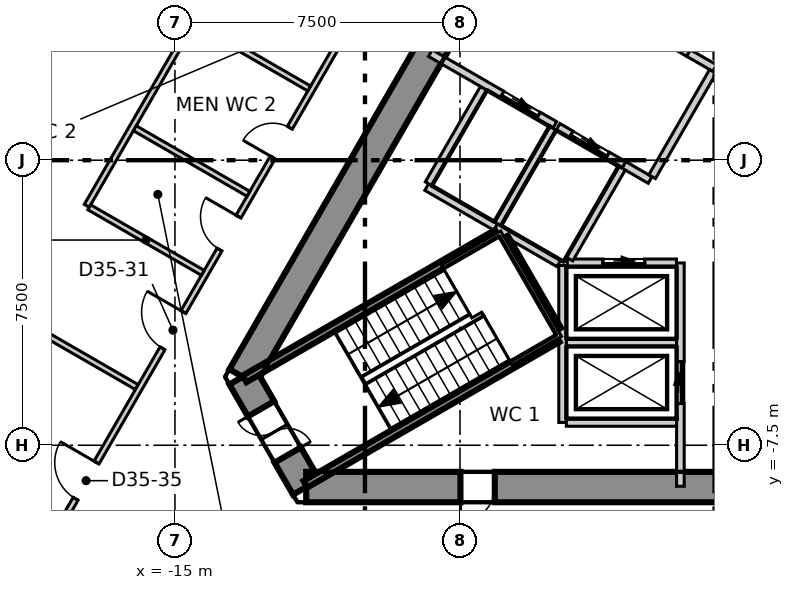
"""IFC4 building model, lengths in metres.
Left out: names, types, materials, properties, quantities, classifications, styles, units other than length and angle.
Written with IfcOpenShell. Run it as: python <this file> out.ifc"""

import sys

from ifc_helpers import new_model, si_unit, direction, frame, frame_2d, origin, place, context, subcontext, project, spatial, polyline, rectangle, outline, extrude, element, fill, save


model = new_model("IFC4")
c1 = context("Model", 3, precision=1e-05, world=origin(), true_north=direction((0.0, 1.0)))
c2 = subcontext(c1, "Body", "Model", "MODEL_VIEW")
j1 = project(units=[si_unit("LENGTHUNIT", "METRE"), si_unit("PLANEANGLEUNIT", "RADIAN")], contexts=[c1])
p1 = place(None, origin())
s1 = spatial("IfcSite", under=j1, at=p1, CompositionType="ELEMENT")
p2 = place(p1, origin())
s2 = spatial("IfcBuilding", under=s1, at=p2, CompositionType="ELEMENT")
p3 = place(p2, frame((0.0, 0.0, 152.3)))
s3 = spatial("IfcBuildingStorey", under=s2, at=p3, CompositionType="ELEMENT", Elevation=152.3)
p4 = place(p3, frame((-1.674, 14.3, -0.3), z_axis=(0.0, 0.0, 1.0), x_axis=(-0.499995765644, -0.866027848477, 0.0)))
e1 = element("IfcWall", 1, at=p4, inside=s3, PredefinedType="SHEAR", context=c2, shape_type="SweptSolid", body=[
    extrude(outline(polyline([(-0.231, -0.4), (1.732, -0.4), (3.695, -0.4), (5.658, -0.4), (7.621, -0.4), (9.584, -0.4), (11.547, -0.4), (13.51, -0.4), (15.473, -0.4), (17.436, -0.4), (19.399, -0.4), (21.362, -0.4), (23.325, -0.4), (22.863, 0.4), (20.977, 0.4), (19.091, 0.4), (17.205, 0.4), (15.319, 0.4), (13.433, 0.4), (11.547, 0.4), (9.661, 0.4), (7.775, 0.4), (5.889, 0.4), (4.003, 0.4), (2.117, 0.4), (0.231, 0.4), (-0.231, -0.4)])), origin(), (0.0, 0.0, 1.0), 4.0),
])
p5 = place(p4, frame((10.997, 0.0, 0.3)))
e2 = element("IfcOpeningElement", 2, at=p5, cuts=e1, PredefinedType="OPENING", context=c2, shape_type="SweptSolid", body=[
    extrude(rectangle(XDim=1.1, YDim=2.1, at=frame_2d((0.55, 1.05))), frame((0.0, 0.41, 0.0), z_axis=(0.0, -1.0, 0.0), x_axis=(1.0, 0.0, 0.0)), (0.0, 0.0, 1.0), 0.82),
])
p6 = place(p4, frame((4.474, 0.0, 0.3)))
e3 = element("IfcOpeningElement", 3, at=p6, cuts=e1, PredefinedType="OPENING", context=c2, shape_type="SweptSolid", body=[
    extrude(rectangle(XDim=0.9, YDim=2.1, at=frame_2d((0.45, 1.05))), frame((0.0, 0.41, 0.0), z_axis=(0.0, -1.0, 0.0), x_axis=(1.0, 0.0, 0.0)), (0.0, 0.0, 1.0), 0.82),
])
p7 = place(p3, frame((-13.221, -5.7, -0.3), z_axis=(0.0, 0.0, 1.0), x_axis=(0.49987182685, -0.866099391942, 0.0)))
e4 = element("IfcWall", 4, at=p7, inside=s3, PredefinedType="SHEAR", context=c2, shape_type="SweptSolid", body=[
    extrude(outline(polyline([(-0.231, -0.4), (1.674, -0.4), (3.579, -0.4), (3.118, 0.4), (1.674, 0.4), (0.231, 0.4), (-0.231, -0.4)])), origin(), (0.0, 0.0, 1.0), 4.0),
])
p8 = place(p7, frame((0.974, 0.0, 0.3)))
e5 = element("IfcOpeningElement", 5, at=p8, cuts=e4, PredefinedType="OPENING", context=c2, shape_type="SweptSolid", body=[
    extrude(rectangle(XDim=1.4, YDim=2.1, at=frame_2d((0.7, 1.05))), frame((0.0, 0.41, 0.0), z_axis=(0.0, -1.0, 0.0), x_axis=(1.0, 0.0, 0.0)), (0.0, 0.0, 1.0), 0.82),
])
p9 = place(p3, frame((-11.547, -8.6, -0.3), z_axis=(0.0, 0.0, 1.0), x_axis=(1.0, 0.0, 0.0)))
e6 = element("IfcWall", 6, at=p9, inside=s3, PredefinedType="SHEAR", context=c2, shape_type="SweptSolid", body=[
    extrude(outline(polyline([(-0.231, -0.4), (1.732, -0.4), (3.695, -0.4), (5.658, -0.4), (7.621, -0.4), (9.584, -0.4), (11.547, -0.4), (13.51, -0.4), (15.473, -0.4), (17.436, -0.4), (19.399, -0.4), (21.362, -0.4), (23.325, -0.4), (22.863, 0.4), (20.977, 0.4), (19.091, 0.4), (17.205, 0.4), (15.319, 0.4), (13.433, 0.4), (11.547, 0.4), (9.661, 0.4), (7.775, 0.4), (5.889, 0.4), (4.003, 0.4), (2.117, 0.4), (0.231, 0.4), (-0.231, -0.4)])), origin(), (0.0, 0.0, 1.0), 4.0),
])
p10 = place(p9, frame((4.061, 0.0, 0.3)))
e7 = element("IfcOpeningElement", 7, at=p10, cuts=e6, PredefinedType="OPENING", context=c2, shape_type="SweptSolid", body=[
    extrude(rectangle(XDim=0.9, YDim=2.1, at=frame_2d((0.45, 1.05))), frame((0.0, 0.41, 0.0), z_axis=(0.0, -1.0, 0.0), x_axis=(1.0, 0.0, 0.0)), (0.0, 0.0, 1.0), 0.82),
])
p11 = place(p9, frame((18.143, 0.0, 0.3)))
e8 = element("IfcOpeningElement", 8, at=p11, cuts=e6, PredefinedType="OPENING", context=c2, shape_type="SweptSolid", body=[
    extrude(rectangle(XDim=1.0, YDim=2.1, at=frame_2d((0.5, 1.05))), frame((0.0, 0.41, 0.0), z_axis=(0.0, -1.0, 0.0), x_axis=(1.0, 0.0, 0.0)), (0.0, 0.0, 1.0), 0.82),
])
p12 = place(p3, frame((-3.018, 33.666, 0.0), z_axis=(0.0, 0.0, 1.0), x_axis=(-0.499984613623, -0.866034286931, 0.0)))
e9 = element("IfcWall", 9, at=p12, inside=s3, PredefinedType="ELEMENTEDWALL", context=c2, shape_type="SweptSolid", body=[
    extrude(rectangle(XDim=55.274, YDim=0.2, at=frame_2d((27.637, 0.0))), origin(), (0.0, 0.0, 1.0), 3.7),
])
p13 = place(p12, frame((2.145, 0.0, 0.9)))
e10 = element("IfcOpeningElement", 10, at=p13, cuts=e9, PredefinedType="OPENING", context=c2, shape_type="SweptSolid", body=[
    extrude(rectangle(XDim=4.9, YDim=2.5, at=frame_2d((2.45, 1.25))), frame((0.0, 0.11, 0.0), z_axis=(0.0, -1.0, 0.0), x_axis=(1.0, 0.0, 0.0)), (0.0, 0.0, 1.0), 0.22),
])
p14 = place(p12, frame((8.731, 0.0, 0.9)))
e11 = element("IfcOpeningElement", 11, at=p14, cuts=e9, PredefinedType="OPENING", context=c2, shape_type="SweptSolid", body=[
    extrude(rectangle(XDim=4.9, YDim=2.5, at=frame_2d((2.45, 1.25))), frame((0.0, 0.11, 0.0), z_axis=(0.0, -1.0, 0.0), x_axis=(1.0, 0.0, 0.0)), (0.0, 0.0, 1.0), 0.22),
])
p15 = place(p12, frame((15.318, 0.0, 0.9)))
e12 = element("IfcOpeningElement", 12, at=p15, cuts=e9, PredefinedType="OPENING", context=c2, shape_type="SweptSolid", body=[
    extrude(rectangle(XDim=4.9, YDim=2.5, at=frame_2d((2.45, 1.25))), frame((0.0, 0.11, 0.0), z_axis=(0.0, -1.0, 0.0), x_axis=(1.0, 0.0, 0.0)), (0.0, 0.0, 1.0), 0.22),
])
p16 = place(p12, frame((21.904, 0.0, 0.9)))
e13 = element("IfcOpeningElement", 13, at=p16, cuts=e9, PredefinedType="OPENING", context=c2, shape_type="SweptSolid", body=[
    extrude(rectangle(XDim=4.9, YDim=2.5, at=frame_2d((2.45, 1.25))), frame((0.0, 0.11, 0.0), z_axis=(0.0, -1.0, 0.0), x_axis=(1.0, 0.0, 0.0)), (0.0, 0.0, 1.0), 0.22),
])
p17 = place(p12, frame((28.49, 0.0, 0.9)))
e14 = element("IfcOpeningElement", 14, at=p17, cuts=e9, PredefinedType="OPENING", context=c2, shape_type="SweptSolid", body=[
    extrude(rectangle(XDim=4.9, YDim=2.5, at=frame_2d((2.45, 1.25))), frame((0.0, 0.11, 0.0), z_axis=(0.0, -1.0, 0.0), x_axis=(1.0, 0.0, 0.0)), (0.0, 0.0, 1.0), 0.22),
])
p18 = place(p12, frame((35.076, 0.0, 0.9)))
e15 = element("IfcOpeningElement", 15, at=p18, cuts=e9, PredefinedType="OPENING", context=c2, shape_type="SweptSolid", body=[
    extrude(rectangle(XDim=4.9, YDim=2.5, at=frame_2d((2.45, 1.25))), frame((0.0, 0.11, 0.0), z_axis=(0.0, -1.0, 0.0), x_axis=(1.0, 0.0, 0.0)), (0.0, 0.0, 1.0), 0.22),
])
p19 = place(p12, frame((41.662, 0.0, 0.9)))
e16 = element("IfcOpeningElement", 16, at=p19, cuts=e9, PredefinedType="OPENING", context=c2, shape_type="SweptSolid", body=[
    extrude(rectangle(XDim=4.9, YDim=2.5, at=frame_2d((2.45, 1.25))), frame((0.0, 0.11, 0.0), z_axis=(0.0, -1.0, 0.0), x_axis=(1.0, 0.0, 0.0)), (0.0, 0.0, 1.0), 0.22),
])
p20 = place(p12, frame((48.248, 0.0, 0.9)))
e17 = element("IfcOpeningElement", 17, at=p20, cuts=e9, PredefinedType="OPENING", context=c2, shape_type="SweptSolid", body=[
    extrude(rectangle(XDim=4.9, YDim=2.5, at=frame_2d((2.45, 1.25))), frame((0.0, 0.11, 0.0), z_axis=(0.0, -1.0, 0.0), x_axis=(1.0, 0.0, 0.0)), (0.0, 0.0, 1.0), 0.22),
])
p21 = place(p3, frame((-23.357, -1.725, 0.0), z_axis=(0.0, 0.0, 1.0), x_axis=(0.866045766046, -0.49996472987, 0.0)))
e18 = element("IfcWall", 18, at=p21, inside=s3, PredefinedType="PARTITIONING", context=c2, shape_type="SweptSolid", body=[
    extrude(rectangle(XDim=8.49, YDim=0.15, at=frame_2d((4.245, 0.0))), origin(), (0.0, 0.0, 1.0), 3.7),
])
p22 = place(p3, frame((-18.631, -10.67, 0.0), z_axis=(0.0, 0.0, 1.0), x_axis=(0.500017706633, 0.866015180614, 0.0)))
e19 = element("IfcWall", 19, at=p22, inside=s3, PredefinedType="PARTITIONING", context=c2, shape_type="SweptSolid", body=[
    extrude(rectangle(XDim=17.656, YDim=0.15, at=frame_2d((8.828, 0.0))), origin(), (0.0, 0.0, 1.0), 3.7),
])
p23 = place(p22, frame((6.606, 0.0, 0.0)))
e20 = element("IfcOpeningElement", 20, at=p23, cuts=e19, PredefinedType="OPENING", context=c2, shape_type="SweptSolid", body=[
    extrude(rectangle(XDim=1.1, YDim=2.1, at=frame_2d((0.55, 1.05))), frame((0.0, 0.085, 0.0), z_axis=(0.0, -1.0, 0.0), x_axis=(1.0, 0.0, 0.0)), (0.0, 0.0, 1.0), 0.17),
])
p24 = place(p22, frame((12.406, 0.0, 0.0)))
e21 = element("IfcOpeningElement", 21, at=p24, cuts=e19, PredefinedType="OPENING", context=c2, shape_type="SweptSolid", body=[
    extrude(rectangle(XDim=0.9, YDim=2.1, at=frame_2d((0.45, 1.05))), frame((0.0, 0.085, 0.0), z_axis=(0.0, -1.0, 0.0), x_axis=(1.0, 0.0, 0.0)), (0.0, 0.0, 1.0), 0.17),
])
p25 = place(p22, frame((9.606, 0.0, 0.0)))
e22 = element("IfcOpeningElement", 22, at=p25, cuts=e19, PredefinedType="OPENING", context=c2, shape_type="SweptSolid", body=[
    extrude(rectangle(XDim=1.0, YDim=2.1, at=frame_2d((0.5, 1.05))), frame((0.0, 0.085, 0.0), z_axis=(0.0, -1.0, 0.0), x_axis=(1.0, 0.0, 0.0)), (0.0, 0.0, 1.0), 0.17),
])
p26 = place(p22, frame((2.034, 0.0, 0.0)))
e23 = element("IfcOpeningElement", 23, at=p26, cuts=e19, PredefinedType="OPENING", context=c2, shape_type="SweptSolid", body=[
    extrude(rectangle(XDim=1.1, YDim=2.1, at=frame_2d((0.55, 1.05))), frame((0.0, 0.085, 0.0), z_axis=(0.0, -1.0, 0.0), x_axis=(1.0, 0.0, 0.0)), (0.0, 0.0, 1.0), 0.17),
])
p27 = place(p3, frame((-17.321, -1.2, 0.0), z_axis=(0.0, 0.0, 1.0), x_axis=(0.500054279689, 0.865994063124, 0.0)))
e24 = element("IfcWall", 24, at=p27, inside=s3, PredefinedType="PARTITIONING", context=c2, shape_type="SweptSolid", body=[
    extrude(rectangle(XDim=8.725, YDim=0.15, at=frame_2d((4.363, 0.0))), origin(), (0.0, 0.0, 1.0), 3.7),
])
p28 = place(p3, frame((-17.256, -1.238, 0.0), z_axis=(0.0, 0.0, 1.0), x_axis=(0.866061862632, -0.499936846106, 0.0)))
e25 = element("IfcWall", 25, at=p28, inside=s3, PredefinedType="PARTITIONING", context=c2, shape_type="SweptSolid", body=[
    extrude(rectangle(XDim=3.45, YDim=0.15, at=frame_2d((1.725, 0.0))), origin(), (0.0, 0.0, 1.0), 3.7),
])
p29 = place(p3, frame((-16.056, 0.841, 0.0), z_axis=(0.0, 0.0, 1.0), x_axis=(0.866013532718, -0.500020560727, 0.0)))
e26 = element("IfcWall", 26, at=p29, inside=s3, PredefinedType="PARTITIONING", context=c2, shape_type="SweptSolid", body=[
    extrude(rectangle(XDim=3.45, YDim=0.15, at=frame_2d((1.725, 0.0))), origin(), (0.0, 0.0, 1.0), 3.7),
])
p30 = place(p3, frame((-14.456, 3.612, 0.0), z_axis=(0.0, 0.0, 1.0), x_axis=(0.866031223622, -0.49998991961, 0.0)))
e27 = element("IfcWall", 27, at=p30, inside=s3, PredefinedType="PARTITIONING", context=c2, shape_type="SweptSolid", body=[
    extrude(rectangle(XDim=3.45, YDim=0.15, at=frame_2d((1.725, 0.0))), origin(), (0.0, 0.0, 1.0), 3.7),
])
p31 = place(p3, frame((-8.376, -0.707, 0.0), z_axis=(0.0, 0.0, 1.0), x_axis=(0.866067520717, -0.499927044236, 0.0)))
e28 = element("IfcWall", 28, at=p31, inside=s3, PredefinedType="SOLIDWALL", context=c2, shape_type="SweptSolid", body=[
    extrude(rectangle(XDim=2.1, YDim=0.2, at=frame_2d((1.05, 0.0))), origin(), (0.0, 0.0, 1.0), 3.7),
])
p32 = place(p3, frame((-8.326, -0.62, 0.0), z_axis=(0.0, 0.0, 1.0), x_axis=(0.500023687443, 0.866011727401, 0.0)))
e29 = element("IfcWall", 29, at=p32, inside=s3, PredefinedType="SOLIDWALL", context=c2, shape_type="SweptSolid", body=[
    extrude(rectangle(XDim=2.9, YDim=0.2, at=frame_2d((1.45, 0.0))), origin(), (0.0, 0.0, 1.0), 3.7),
])
p33 = place(p3, frame((-4.8, -6.9, 0.0), z_axis=(0.0, 0.0, 1.0), x_axis=(0.0, 1.0, 0.0)))
e30 = element("IfcWall", 30, at=p33, inside=s3, PredefinedType="SOLIDWALL", context=c2, shape_type="SweptSolid", body=[
    extrude(rectangle(XDim=4.131, YDim=0.2, at=frame_2d((2.065, 0.0))), origin(), (0.0, 0.0, 1.0), 3.7),
])
for number, where, z_axis, x_axis in (
    (31, (-4.7, -6.9, 0.0), (0.0, 0.0, 1.0), (1.0, 0.0, 0.0)),
    (32, (-4.7, -4.8, 0.0), (0.0, 0.0, 1.0), (1.0, 0.0, 0.0)),
):
    element("IfcWall", number, at=place(p3, frame(where, z_axis=z_axis, x_axis=x_axis)), inside=s3, PredefinedType="SOLIDWALL", context=c2, shape_type="SweptSolid", body=[
        extrude(rectangle(XDim=2.9, YDim=0.2, at=frame_2d((1.45, 0.0))), origin(), (0.0, 0.0, 1.0), 3.7),
    ])
p34 = place(p3, frame((-1.7, -8.58, 0.0), z_axis=(0.0, 0.0, 1.0), x_axis=(0.0, 1.0, 0.0)))
e33 = element("IfcWall", 33, at=p34, inside=s3, PredefinedType="SOLIDWALL", context=c2, shape_type="SweptSolid", body=[
    extrude(rectangle(XDim=5.877, YDim=0.2, at=frame_2d((2.938, 0.0))), origin(), (0.0, 0.0, 1.0), 3.7),
])
p35 = place(p34, frame((2.18, 0.0, 0.0)))
e34 = element("IfcOpeningElement", 34, at=p35, cuts=e33, PredefinedType="OPENING", context=c2, shape_type="SweptSolid", body=[
    extrude(rectangle(XDim=1.1, YDim=2.1, at=frame_2d((0.55, 1.05))), frame((0.0, 0.11, 0.0), z_axis=(0.0, -1.0, 0.0), x_axis=(1.0, 0.0, 0.0)), (0.0, 0.0, 1.0), 0.22),
])
p36 = place(p3, frame((-4.676, -2.7, 0.0), z_axis=(0.0, 0.0, 1.0), x_axis=(1.0, 0.0, 0.0)))
e35 = element("IfcWall", 35, at=p36, inside=s3, PredefinedType="SOLIDWALL", context=c2, shape_type="SweptSolid", body=[
    extrude(rectangle(XDim=2.873, YDim=0.2, at=frame_2d((1.437, 0.0))), origin(), (0.0, 0.0, 1.0), 3.7),
])
p37 = place(p36, frame((0.937, 0.0, 0.0)))
e36 = element("IfcOpeningElement", 36, at=p37, cuts=e35, PredefinedType="OPENING", context=c2, shape_type="SweptSolid", body=[
    extrude(rectangle(XDim=1.1, YDim=2.1, at=frame_2d((0.55, 1.05))), frame((0.0, 0.11, 0.0), z_axis=(0.0, -1.0, 0.0), x_axis=(1.0, 0.0, 0.0)), (0.0, 0.0, 1.0), 0.22),
])
p38 = place(p3, frame((-8.28, 2.818, 0.0), z_axis=(0.0, 0.0, 1.0), x_axis=(0.86600175068, -0.50004096614, 0.0)))
e37 = element("IfcWall", 37, at=p38, inside=s3, PredefinedType="SOLIDWALL", context=c2, shape_type="SweptSolid", body=[
    extrude(rectangle(XDim=3.782, YDim=0.2, at=frame_2d((1.891, 0.0))), origin(), (0.0, 0.0, 1.0), 3.7),
])
p39 = place(p38, frame((2.18, 0.0, 0.0)))
e38 = element("IfcOpeningElement", 38, at=p39, cuts=e37, PredefinedType="OPENING", context=c2, shape_type="SweptSolid", body=[
    extrude(rectangle(XDim=1.1, YDim=2.1, at=frame_2d((0.55, 1.05))), frame((0.0, 0.11, 0.0), z_axis=(0.0, -1.0, 0.0), x_axis=(1.0, 0.0, 0.0)), (0.0, 0.0, 1.0), 0.22),
])
p40 = place(p3, frame((-3.188, -0.122, 0.0), z_axis=(0.0, 0.0, 1.0), x_axis=(0.865705793592, -0.50055317294, 0.0)))
e39 = element("IfcWall", 39, at=p40, inside=s3, PredefinedType="SOLIDWALL", context=c2, shape_type="SweptSolid", body=[
    extrude(rectangle(XDim=0.797, YDim=0.2, at=frame_2d((0.398, 0.0))), origin(), (0.0, 0.0, 1.0), 3.7),
])
p41 = place(p3, frame((-1.488, 2.822, 0.0), z_axis=(0.0, 0.0, 1.0), x_axis=(0.866236612152, -0.499633997809, 0.0)))
e40 = element("IfcWall", 40, at=p41, inside=s3, PredefinedType="SOLIDWALL", context=c2, shape_type="SweptSolid", body=[
    extrude(rectangle(XDim=0.796, YDim=0.2, at=frame_2d((0.398, 0.0))), origin(), (0.0, 0.0, 1.0), 3.7),
])
p42 = place(p3, frame((-2.444, -0.433, 0.0), z_axis=(0.0, 0.0, 1.0), x_axis=(0.500035624827, 0.866004834804, 0.0)))
e41 = element("IfcWall", 41, at=p42, inside=s3, PredefinedType="SOLIDWALL", context=c2, shape_type="SweptSolid", body=[
    extrude(rectangle(XDim=3.194, YDim=0.2, at=frame_2d((1.597, 0.0))), origin(), (0.0, 0.0, 1.0), 3.7),
])
p43 = place(p3, frame((-6.557, -1.757, 0.0), z_axis=(0.0, 0.0, 1.0), x_axis=(0.8659754619, -0.500086491905, 0.0)))
e42 = element("IfcWall", 42, at=p43, inside=s3, PredefinedType="SOLIDWALL", context=c2, shape_type="SweptSolid", body=[
    extrude(rectangle(XDim=1.916, YDim=0.2, at=frame_2d((0.958, 0.0))), origin(), (0.0, 0.0, 1.0), 3.7),
])
p44 = place(p3, frame((-6.507, -1.67, 0.0), z_axis=(0.0, 0.0, 1.0), x_axis=(0.50012328804, 0.865954211699, 0.0)))
e43 = element("IfcWall", 43, at=p44, inside=s3, PredefinedType="SOLIDWALL", context=c2, shape_type="SweptSolid", body=[
    extrude(rectangle(XDim=2.9, YDim=0.2, at=frame_2d((1.45, 0.0))), origin(), (0.0, 0.0, 1.0), 3.7),
])
p45 = place(p3, frame((-4.92, 0.878, 0.0), z_axis=(0.0, 0.0, 1.0), x_axis=(0.866010750942, -0.50002537861, 0.0)))
e44 = element("IfcWall", 44, at=p45, inside=s3, PredefinedType="SOLIDWALL", context=c2, shape_type="SweptSolid", body=[
    extrude(rectangle(XDim=2.0, YDim=0.2, at=frame_2d((1.0, 0.0))), origin(), (0.0, 0.0, 1.0), 3.7),
])
p46 = place(p45, frame((0.4, 0.0, 0.0)))
e45 = element("IfcOpeningElement", 45, at=p46, cuts=e44, PredefinedType="OPENING", context=c2, shape_type="SweptSolid", body=[
    extrude(rectangle(XDim=1.1, YDim=2.1, at=frame_2d((0.55, 1.05))), frame((0.0, 0.11, 0.0), z_axis=(0.0, -1.0, 0.0), x_axis=(1.0, 0.0, 0.0)), (0.0, 0.0, 1.0), 0.22),
])
p47 = place(p3, frame((-4.619, -2.6, 0.0), z_axis=(0.0, 0.0, 1.0), x_axis=(0.50009492287, 0.865970593103, 0.0)))
e46 = element("IfcWall", 46, at=p47, inside=s3, PredefinedType="SOLIDWALL", context=c2, shape_type="SweptSolid", body=[
    extrude(rectangle(XDim=2.761, YDim=0.2, at=frame_2d((1.381, 0.0))), origin(), (0.0, 0.0, 1.0), 3.7),
])
p48 = place(p3, frame((-3.309, 3.873, 0.0), z_axis=(0.0, 0.0, 1.0), x_axis=(0.866098583652, -0.499873227325, 0.0)))
e47 = element("IfcWall", 47, at=p48, inside=s3, PredefinedType="SOLIDWALL", context=c2, shape_type="SweptSolid", body=[
    extrude(rectangle(XDim=2.103, YDim=0.2, at=frame_2d((1.051, 0.0))), origin(), (0.0, 0.0, 1.0), 3.7),
])
p49 = place(p48, frame((0.502, 0.0, 0.0)))
e48 = element("IfcOpeningElement", 48, at=p49, cuts=e47, PredefinedType="OPENING", context=c2, shape_type="SweptSolid", body=[
    extrude(rectangle(XDim=1.1, YDim=2.1, at=frame_2d((0.55, 1.05))), frame((0.0, 0.11, 0.0), z_axis=(0.0, -1.0, 0.0), x_axis=(1.0, 0.0, 0.0)), (0.0, 0.0, 1.0), 0.22),
])
p50 = place(p3, frame((-13.167, -5.754, 0.0), z_axis=(0.0, 0.0, 1.0), x_axis=(0.866060938598, 0.499938446846, 0.0)))
e49 = element("IfcWall", 49, at=p50, inside=s3, PredefinedType="SOLIDWALL", context=c2, shape_type="SweptSolid", body=[
    extrude(rectangle(XDim=7.665, YDim=0.2, at=frame_2d((3.832, 0.0))), origin(), (0.0, 0.0, 1.0), 3.7),
])
p51 = place(p3, frame((-6.329, -2.038, 0.0), z_axis=(0.0, 0.0, 1.0), x_axis=(0.500200581029, -0.865909567298, 0.0)))
e50 = element("IfcWall", 50, at=p51, inside=s3, PredefinedType="SOLIDWALL", context=c2, shape_type="SweptSolid", body=[
    extrude(rectangle(XDim=2.799, YDim=0.2, at=frame_2d((1.399, 0.0))), origin(), (0.0, 0.0, 1.0), 3.7),
])
p52 = place(p3, frame((-11.567, -8.526, 0.0), z_axis=(0.0, 0.0, 1.0), x_axis=(0.866005769735, 0.50003400563, 0.0)))
e51 = element("IfcWall", 51, at=p52, inside=s3, PredefinedType="SOLIDWALL", context=c2, shape_type="SweptSolid", body=[
    extrude(rectangle(XDim=7.665, YDim=0.2, at=frame_2d((3.833, 0.0))), origin(), (0.0, 0.0, 1.0), 3.7),
])
p53 = place(p37, origin())
e52 = element("IfcDoor", 52, at=p53, inside=s3, OperationType="SLIDING_TO_LEFT", PredefinedType="DOOR", context=c2, shape_type="SweptSolid", body=[
    extrude(rectangle(XDim=1.1, YDim=2.1, at=frame_2d((0.55, 1.05))), frame((0.0, 0.025, 0.0), z_axis=(0.0, -1.0, 0.0), x_axis=(1.0, 0.0, 0.0)), (0.0, 0.0, 1.0), 0.05),
])
fill(e36, e52)
p54 = place(p35, origin())
e53 = element("IfcDoor", 53, at=p54, inside=s3, OperationType="SLIDING_TO_LEFT", PredefinedType="DOOR", context=c2, shape_type="SweptSolid", body=[
    extrude(rectangle(XDim=1.1, YDim=2.1, at=frame_2d((0.55, 1.05))), frame((0.0, 0.025, 0.0), z_axis=(0.0, -1.0, 0.0), x_axis=(1.0, 0.0, 0.0)), (0.0, 0.0, 1.0), 0.05),
])
fill(e34, e53)
p55 = place(p46, origin())
e54 = element("IfcDoor", 54, at=p55, inside=s3, OperationType="SLIDING_TO_LEFT", PredefinedType="DOOR", context=c2, shape_type="SweptSolid", body=[
    extrude(rectangle(XDim=1.1, YDim=2.1, at=frame_2d((0.55, 1.05))), frame((0.0, 0.025, 0.0), z_axis=(0.0, -1.0, 0.0), x_axis=(1.0, 0.0, 0.0)), (0.0, 0.0, 1.0), 0.05),
])
fill(e45, e54)
p56 = place(p39, origin())
e55 = element("IfcDoor", 55, at=p56, inside=s3, OperationType="SLIDING_TO_LEFT", PredefinedType="DOOR", context=c2, shape_type="SweptSolid", body=[
    extrude(rectangle(XDim=1.1, YDim=2.1, at=frame_2d((0.55, 1.05))), frame((0.0, 0.025, 0.0), z_axis=(0.0, -1.0, 0.0), x_axis=(1.0, 0.0, 0.0)), (0.0, 0.0, 1.0), 0.05),
])
fill(e38, e55)
p57 = place(p23, origin())
e56 = element("IfcDoor", 56, at=p57, inside=s3, OperationType="SINGLE_SWING_LEFT", PredefinedType="DOOR", context=c2, shape_type="SweptSolid", body=[
    extrude(rectangle(XDim=1.1, YDim=2.1, at=frame_2d((0.55, 1.05))), frame((0.0, 0.025, 0.0), z_axis=(0.0, -1.0, 0.0), x_axis=(1.0, 0.0, 0.0)), (0.0, 0.0, 1.0), 0.05),
])
fill(e20, e56)
p58 = place(p24, origin())
e57 = element("IfcDoor", 57, at=p58, inside=s3, OperationType="SINGLE_SWING_RIGHT", PredefinedType="DOOR", context=c2, shape_type="SweptSolid", body=[
    extrude(rectangle(XDim=0.9, YDim=2.1, at=frame_2d((0.45, 1.05))), frame((0.0, 0.025, 0.0), z_axis=(0.0, -1.0, 0.0), x_axis=(1.0, 0.0, 0.0)), (0.0, 0.0, 1.0), 0.05),
])
fill(e21, e57)
p59 = place(p25, origin())
e58 = element("IfcDoor", 58, at=p59, inside=s3, OperationType="SINGLE_SWING_LEFT", PredefinedType="DOOR", context=c2, shape_type="SweptSolid", body=[
    extrude(rectangle(XDim=1.0, YDim=2.1, at=frame_2d((0.5, 1.05))), frame((0.0, 0.025, 0.0), z_axis=(0.0, -1.0, 0.0), x_axis=(1.0, 0.0, 0.0)), (0.0, 0.0, 1.0), 0.05),
])
fill(e22, e58)
p60 = place(p26, origin())
e59 = element("IfcDoor", 59, at=p60, inside=s3, OperationType="SINGLE_SWING_LEFT", PredefinedType="DOOR", context=c2, shape_type="SweptSolid", body=[
    extrude(rectangle(XDim=1.1, YDim=2.1, at=frame_2d((0.55, 1.05))), frame((0.0, 0.025, 0.0), z_axis=(0.0, -1.0, 0.0), x_axis=(1.0, 0.0, 0.0)), (0.0, 0.0, 1.0), 0.05),
])
fill(e23, e59)
p61 = place(p8, origin())
e60 = element("IfcDoor", 60, at=p61, inside=s3, OperationType="DOUBLE_DOOR_SINGLE_SWING", PredefinedType="DOOR", context=c2, shape_type="SweptSolid", body=[
    extrude(rectangle(XDim=1.4, YDim=2.1, at=frame_2d((0.7, 1.05))), frame((0.0, 0.025, 0.0), z_axis=(0.0, -1.0, 0.0), x_axis=(1.0, 0.0, 0.0)), (0.0, 0.0, 1.0), 0.05),
])
fill(e5, e60)
p62 = place(p10, origin())
e61 = element("IfcDoor", 61, at=p62, inside=s3, OperationType="SINGLE_SWING_LEFT", PredefinedType="DOOR", context=c2, shape_type="SweptSolid", body=[
    extrude(rectangle(XDim=0.9, YDim=2.1, at=frame_2d((0.45, 1.05))), frame((0.0, 0.125, 0.0), z_axis=(0.0, -1.0, 0.0), x_axis=(1.0, 0.0, 0.0)), (0.0, 0.0, 1.0), 0.05),
])
fill(e7, e61)
save(model, sys.argv[1])
